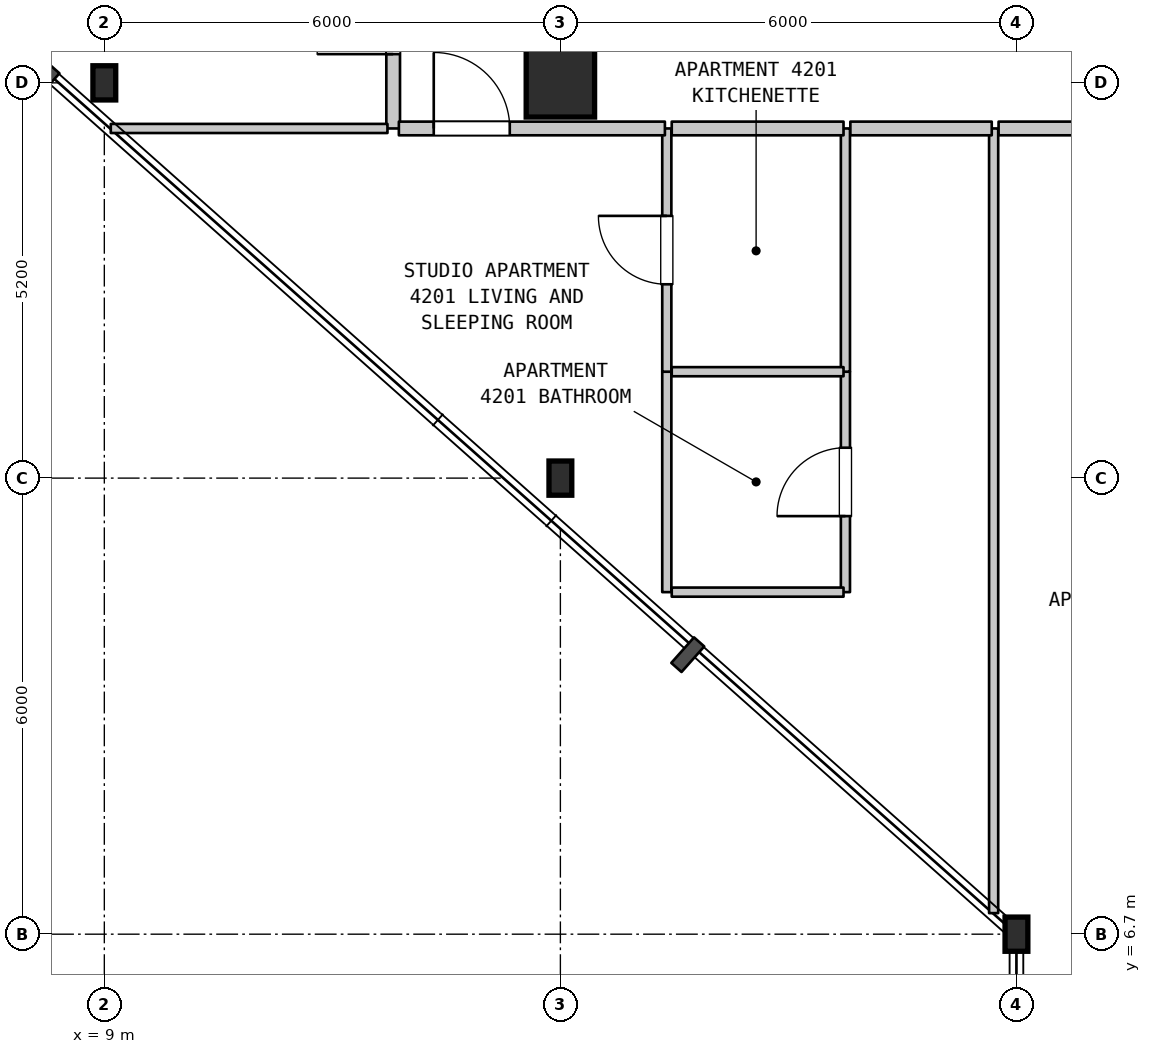
"""IFC4 building model, lengths in metres.
Left out: names, types, materials, properties, quantities, classifications, styles, units other than length and angle.
Written with IfcOpenShell. Run it as: python <this file> out.ifc"""

import sys

from ifc_helpers import new_model, si_unit, direction, frame, frame_2d, origin, origin_2d, place, context, subcontext, project, spatial, rectangle, i_section, extrude, element, fill, save


model = new_model("IFC4")
c1 = context("Model", 3, precision=1e-05, world=origin(), true_north=direction((0.0, 1.0)))
c2 = subcontext(c1, "Body", "Model", "MODEL_VIEW")
j1 = project(units=[si_unit("LENGTHUNIT", "METRE"), si_unit("PLANEANGLEUNIT", "RADIAN")], contexts=[c1])
p1 = place(None, origin())
s1 = spatial("IfcSite", under=j1, at=p1, CompositionType="ELEMENT")
p2 = place(p1, origin())
s2 = spatial("IfcBuilding", under=s1, at=p2, CompositionType="ELEMENT")
p3 = place(p2, frame((0.0, 0.0, 172.8)))
s3 = spatial("IfcBuildingStorey", under=s2, at=p3, CompositionType="ELEMENT", Elevation=172.8)
for number, where, z_axis, x_axis in (
    (1, (9.0, 17.9, 0.0), (0.0, 0.0, 1.0), (1.0, 0.0, 0.0)),
    (2, (15.0, 12.7, 0.0), (0.0, 0.0, 1.0), (1.0, 0.0, 0.0)),
):
    element("IfcColumn", number, at=place(p3, frame(where, z_axis=z_axis, x_axis=x_axis)), inside=s3, PredefinedType="COLUMN", context=c2, shape_type="SweptSolid", body=[
        extrude(i_section(OverallWidth=0.3, OverallDepth=0.45, WebThickness=0.014, FlangeThickness=0.026, FilletRadius=0.027, at=origin_2d()), origin(), (0.0, 0.0, 1.0), 3.7),
    ])
p4 = place(p3, frame((15.0, 17.9, 0.0), z_axis=(0.0, 0.0, 1.0), x_axis=(1.0, 0.0, 0.0)))
e3 = element("IfcColumn", 3, at=p4, inside=s3, PredefinedType="COLUMN", context=c2, shape_type="SweptSolid", body=[
    extrude(rectangle(XDim=0.9, YDim=0.9, at=origin_2d()), origin(), (0.0, 0.0, 1.0), 3.7),
])
p5 = place(p3, frame((21.0, 6.7, 0.0), z_axis=(0.0, 0.0, 1.0), x_axis=(1.0, 0.0, 0.0)))
e4 = element("IfcColumn", 4, at=p5, inside=s3, PredefinedType="COLUMN", context=c2, shape_type="SweptSolid", body=[
    extrude(i_section(OverallWidth=0.3, OverallDepth=0.45, WebThickness=0.014, FlangeThickness=0.026, FilletRadius=0.027, at=origin_2d()), origin(), (0.0, 0.0, 1.0), 3.7),
])
p6 = place(p3, frame((12.8, 17.3, 0.0), z_axis=(0.0, 0.0, 1.0), x_axis=(0.0, 1.0, 0.0)))
e5 = element("IfcWall", 5, at=p6, inside=s3, PredefinedType="STANDARD", context=c2, shape_type="SweptSolid", body=[
    extrude(rectangle(XDim=3.1, YDim=0.18, at=frame_2d((1.55, 0.0))), origin(), (0.0, 0.0, 1.0), 3.39),
])
p7 = place(p6, frame((0.978, 0.0, 0.0)))
e6 = element("IfcOpeningElement", 6, at=p7, cuts=e5, PredefinedType="OPENING", context=c2, shape_type="SweptSolid", body=[
    extrude(rectangle(XDim=1.0, YDim=2.15, at=frame_2d((0.5, 1.075))), frame((0.0, 0.1, 0.0), z_axis=(0.0, -1.0, 0.0), x_axis=(1.0, 0.0, 0.0)), (0.0, 0.0, 1.0), 0.2),
])
p8 = place(p3, frame((16.4, 11.2, 0.0), z_axis=(0.0, 0.0, 1.0), x_axis=(0.0, 1.0, 0.0)))
e7 = element("IfcWall", 7, at=p8, inside=s3, PredefinedType="PARTITIONING", context=c2, shape_type="SweptSolid", body=[
    extrude(rectangle(XDim=2.9, YDim=0.12, at=frame_2d((1.45, 0.0))), origin(), (0.0, 0.0, 1.0), 3.39),
])
p9 = place(p3, frame((16.4, 14.1, 0.0), z_axis=(0.0, 0.0, 1.0), x_axis=(0.0, 1.0, 0.0)))
e8 = element("IfcWall", 8, at=p9, inside=s3, PredefinedType="PARTITIONING", context=c2, shape_type="SweptSolid", body=[
    extrude(rectangle(XDim=3.2, YDim=0.12, at=frame_2d((1.6, 0.0))), origin(), (0.0, 0.0, 1.0), 3.39),
])
p10 = place(p9, frame((1.15, 0.0, 0.0)))
e9 = element("IfcOpeningElement", 9, at=p10, cuts=e8, PredefinedType="OPENING", context=c2, shape_type="SweptSolid", body=[
    extrude(rectangle(XDim=0.9, YDim=2.15, at=frame_2d((0.45, 1.075))), frame((0.0, 0.07, 0.0), z_axis=(0.0, -1.0, 0.0), x_axis=(1.0, 0.0, 0.0)), (0.0, 0.0, 1.0), 0.14),
])
p11 = place(p3, frame((18.75, 11.2, 0.0), z_axis=(0.0, 0.0, 1.0), x_axis=(0.0, 1.0, 0.0)))
e10 = element("IfcWall", 10, at=p11, inside=s3, PredefinedType="PARTITIONING", context=c2, shape_type="SweptSolid", body=[
    extrude(rectangle(XDim=2.9, YDim=0.12, at=frame_2d((1.45, 0.0))), origin(), (0.0, 0.0, 1.0), 3.39),
])
p12 = place(p11, frame((1.0, 0.0, 0.0)))
e11 = element("IfcOpeningElement", 11, at=p12, cuts=e10, PredefinedType="OPENING", context=c2, shape_type="SweptSolid", body=[
    extrude(rectangle(XDim=0.9, YDim=2.1, at=frame_2d((0.45, 1.05))), frame((0.0, 0.07, 0.0), z_axis=(0.0, -1.0, 0.0), x_axis=(1.0, 0.0, 0.0)), (0.0, 0.0, 1.0), 0.14),
])
p13 = place(p3, frame((18.75, 14.1, 0.0), z_axis=(0.0, 0.0, 1.0), x_axis=(0.0, 1.0, 0.0)))
e12 = element("IfcWall", 12, at=p13, inside=s3, PredefinedType="PARTITIONING", context=c2, shape_type="SweptSolid", body=[
    extrude(rectangle(XDim=3.2, YDim=0.12, at=frame_2d((1.6, 0.0))), origin(), (0.0, 0.0, 1.0), 3.39),
])
p14 = place(p3, frame((20.7, 6.977, 0.0), z_axis=(0.0, 0.0, 1.0), x_axis=(0.0, 1.0, 0.0)))
e13 = element("IfcWall", 13, at=p14, inside=s3, PredefinedType="PARTITIONING", context=c2, shape_type="SweptSolid", body=[
    extrude(rectangle(XDim=10.323, YDim=0.12, at=frame_2d((5.162, 0.0))), origin(), (0.0, 0.0, 1.0), 3.39),
])
for number, where, z_axis, x_axis in (
    (14, (16.465, 11.2, 0.0), (0.0, 0.0, 1.0), (1.0, 0.0, 0.0)),
    (15, (16.465, 14.1, 0.0), (0.0, 0.0, 1.0), (1.0, 0.0, 0.0)),
):
    element("IfcWall", number, at=place(p3, frame(where, z_axis=z_axis, x_axis=x_axis)), inside=s3, PredefinedType="PARTITIONING", context=c2, shape_type="SweptSolid", body=[
        extrude(rectangle(XDim=2.26, YDim=0.12, at=frame_2d((1.13, 0.0))), origin(), (0.0, 0.0, 1.0), 3.39),
    ])
p15 = place(p3, frame((9.085, 17.3, 0.0), z_axis=(0.0, 0.0, 1.0), x_axis=(1.0, 0.0, 0.0)))
e16 = element("IfcWall", 16, at=p15, inside=s3, PredefinedType="PARTITIONING", context=c2, shape_type="SweptSolid", body=[
    extrude(rectangle(XDim=3.64, YDim=0.12, at=frame_2d((1.82, 0.0))), origin(), (0.0, 0.0, 1.0), 3.39),
])
p16 = place(p3, frame((12.875, 17.3, 0.0), z_axis=(0.0, 0.0, 1.0), x_axis=(1.0, 0.0, 0.0)))
e17 = element("IfcWall", 17, at=p16, inside=s3, PredefinedType="STANDARD", context=c2, shape_type="SweptSolid", body=[
    extrude(rectangle(XDim=3.5, YDim=0.18, at=frame_2d((1.75, 0.0))), origin(), (0.0, 0.0, 1.0), 3.39),
])
p17 = place(p16, frame((0.459, 0.0, 0.0)))
e18 = element("IfcOpeningElement", 18, at=p17, cuts=e17, PredefinedType="OPENING", context=c2, shape_type="SweptSolid", body=[
    extrude(rectangle(XDim=1.0, YDim=2.15, at=frame_2d((0.5, 1.075))), frame((0.0, 0.1, 0.0), z_axis=(0.0, -1.0, 0.0), x_axis=(1.0, 0.0, 0.0)), (0.0, 0.0, 1.0), 0.2),
])
p18 = place(p3, frame((16.465, 17.3, 0.0), z_axis=(0.0, 0.0, 1.0), x_axis=(1.0, 0.0, 0.0)))
e19 = element("IfcWall", 19, at=p18, inside=s3, PredefinedType="STANDARD", context=c2, shape_type="SweptSolid", body=[
    extrude(rectangle(XDim=2.26, YDim=0.18, at=frame_2d((1.13, 0.0))), origin(), (0.0, 0.0, 1.0), 3.39),
])
p19 = place(p3, frame((18.815, 17.3, 0.0), z_axis=(0.0, 0.0, 1.0), x_axis=(1.0, 0.0, 0.0)))
e20 = element("IfcWall", 20, at=p19, inside=s3, PredefinedType="STANDARD", context=c2, shape_type="SweptSolid", body=[
    extrude(rectangle(XDim=1.86, YDim=0.18, at=frame_2d((0.93, 0.0))), origin(), (0.0, 0.0, 1.0), 3.39),
])
p20 = place(p3, frame((20.765, 17.3, 0.0), z_axis=(0.0, 0.0, 1.0), x_axis=(1.0, 0.0, 0.0)))
e21 = element("IfcWall", 21, at=p20, inside=s3, PredefinedType="STANDARD", context=c2, shape_type="SweptSolid", body=[
    extrude(rectangle(XDim=4.52, YDim=0.18, at=frame_2d((2.26, 0.0))), origin(), (0.0, 0.0, 1.0), 3.39),
])
p21 = place(p20, frame((1.76, 0.0, 0.0)))
e22 = element("IfcOpeningElement", 22, at=p21, cuts=e21, PredefinedType="OPENING", context=c2, shape_type="SweptSolid", body=[
    extrude(rectangle(XDim=1.0, YDim=2.15, at=frame_2d((0.5, 1.075))), frame((0.0, 0.1, 0.0), z_axis=(0.0, -1.0, 0.0), x_axis=(1.0, 0.0, 0.0)), (0.0, 0.0, 1.0), 0.2),
])
p22 = place(p7, origin())
e23 = element("IfcDoor", 23, at=p22, inside=s3, OperationType="SINGLE_SWING_LEFT", PredefinedType="DOOR", context=c2, shape_type="SweptSolid", body=[
    extrude(rectangle(XDim=1.0, YDim=2.15, at=frame_2d((0.5, 1.075))), frame((0.0, 0.025, 0.0), z_axis=(0.0, -1.0, 0.0), x_axis=(1.0, 0.0, 0.0)), (0.0, 0.0, 1.0), 0.05),
])
fill(e6, e23)
p23 = place(p10, origin())
e24 = element("IfcDoor", 24, at=p23, inside=s3, OperationType="SINGLE_SWING_RIGHT", PredefinedType="DOOR", context=c2, shape_type="SweptSolid", body=[
    extrude(rectangle(XDim=0.9, YDim=2.15, at=frame_2d((0.45, 1.075))), frame((0.0, 0.025, 0.0), z_axis=(0.0, -1.0, 0.0), x_axis=(1.0, 0.0, 0.0)), (0.0, 0.0, 1.0), 0.05),
])
fill(e9, e24)
p24 = place(p12, origin())
e25 = element("IfcDoor", 25, at=p24, inside=s3, OperationType="SINGLE_SWING_LEFT", PredefinedType="DOOR", context=c2, shape_type="SweptSolid", body=[
    extrude(rectangle(XDim=0.9, YDim=2.1, at=frame_2d((0.45, 1.05))), frame((0.0, 0.025, 0.0), z_axis=(0.0, -1.0, 0.0), x_axis=(1.0, 0.0, 0.0)), (0.0, 0.0, 1.0), 0.05),
])
fill(e11, e25)
p25 = place(p17, origin())
e26 = element("IfcDoor", 26, at=p25, inside=s3, OperationType="SINGLE_SWING_LEFT", PredefinedType="DOOR", context=c2, shape_type="SweptSolid", body=[
    extrude(rectangle(XDim=1.0, YDim=2.15, at=frame_2d((0.5, 1.075))), frame((0.0, 0.025, 0.0), z_axis=(0.0, -1.0, 0.0), x_axis=(1.0, 0.0, 0.0)), (0.0, 0.0, 1.0), 0.05),
])
fill(e18, e26)
save(model, sys.argv[1])
